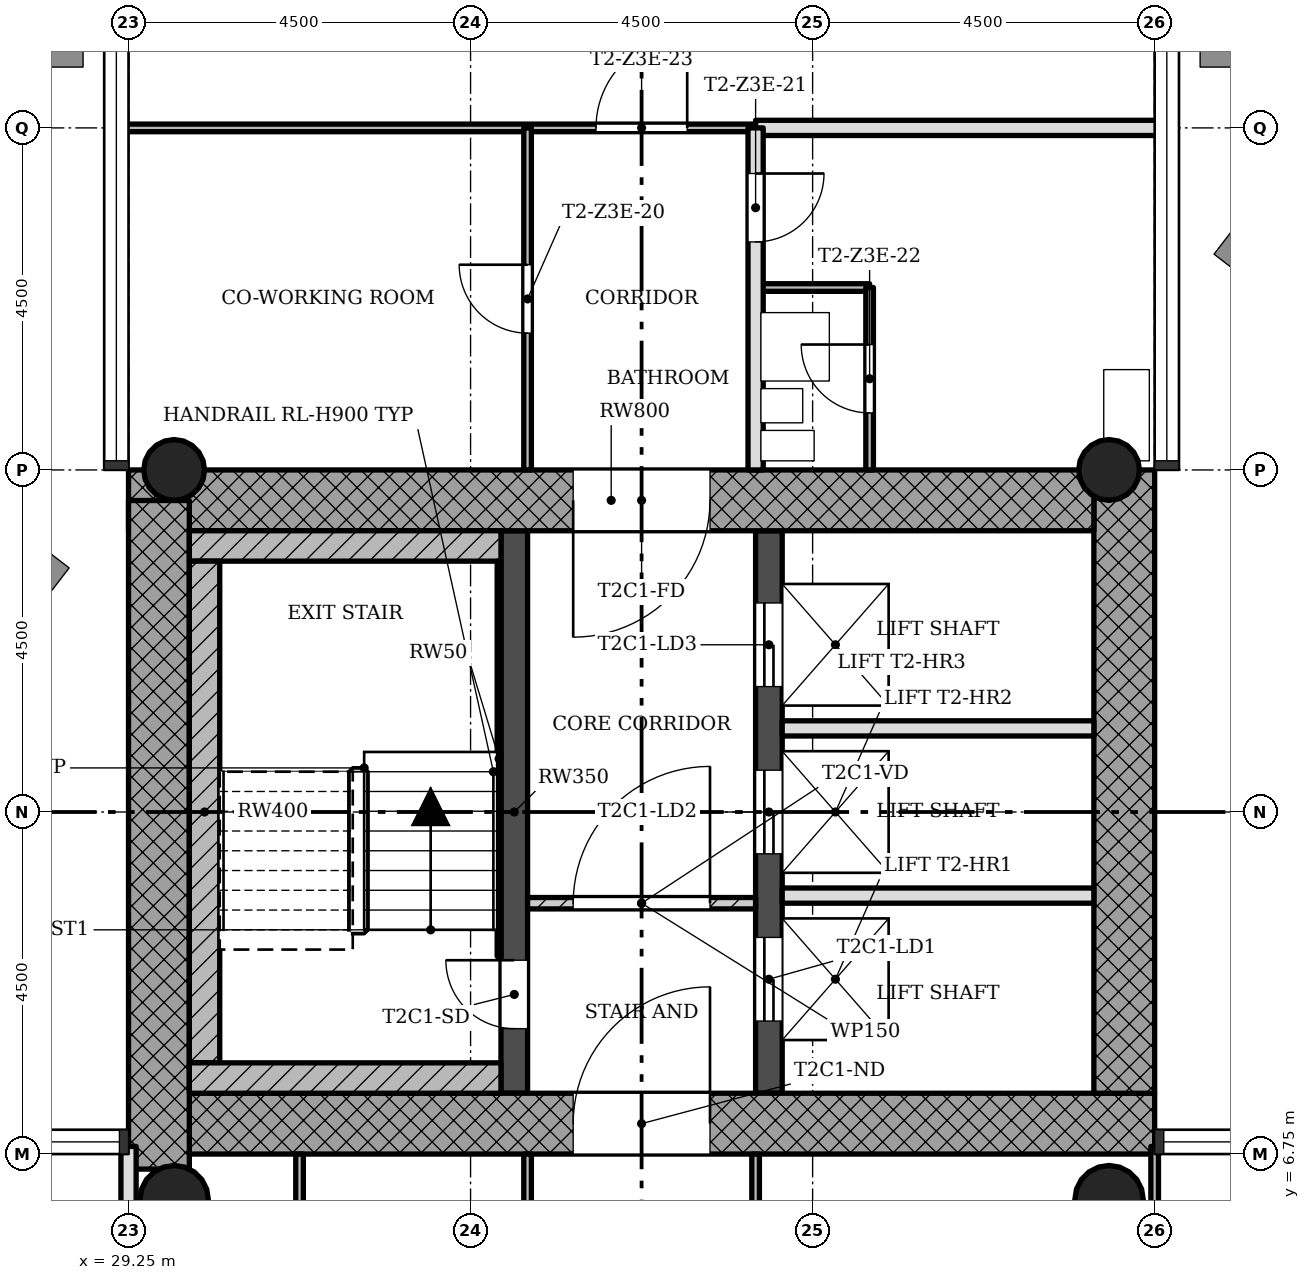
"""IFC4 building model, lengths in metres.
Left out: names, types, materials, properties, quantities, classifications, styles, units other than length and angle.
Written with IfcOpenShell. Run it as: python <this file> out.ifc"""

import sys

from ifc_helpers import new_model, si_unit, direction, frame, frame_2d, origin, origin_2d, place, context, subcontext, project, spatial, rectangle, hollow_circle, extrude, element, fill, save


model = new_model("IFC4")
c1 = context("Model", 3, precision=1e-05, world=origin(), true_north=direction((0.0, 1.0)))
c2 = subcontext(c1, "Body", "Model", "MODEL_VIEW")
j1 = project(units=[si_unit("LENGTHUNIT", "METRE"), si_unit("PLANEANGLEUNIT", "RADIAN")], contexts=[c1])
p1 = place(None, origin())
s1 = spatial("IfcSite", under=j1, at=p1, CompositionType="ELEMENT")
p2 = place(p1, origin())
s2 = spatial("IfcBuilding", under=s1, at=p2, CompositionType="ELEMENT")
p3 = place(p2, frame((0.0, 0.0, 177.9)))
s3 = spatial("IfcBuildingStorey", under=s2, at=p3, CompositionType="ELEMENT", Elevation=177.9)
p4 = place(p3, frame((30.05, 7.15, 0.0), z_axis=(0.0, 0.0, 1.0), x_axis=(1.0, 0.0, 0.0)))
e1 = element("IfcWall", 1, at=p4, inside=s3, PredefinedType="SHEAR", context=c2, shape_type="SweptSolid", body=[
    extrude(rectangle(XDim=12.7, YDim=0.8, at=frame_2d((6.35, 0.0))), origin(), (0.0, 0.0, 1.0), 3.4),
])
p5 = place(p4, frame((5.05, 0.0, 0.0)))
e2 = element("IfcOpeningElement", 2, at=p5, cuts=e1, PredefinedType="OPENING", context=c2, shape_type="SweptSolid", body=[
    extrude(rectangle(XDim=1.8, YDim=2.1, at=frame_2d((0.9, 1.05))), frame((0.0, 0.41, 0.0), z_axis=(0.0, -1.0, 0.0), x_axis=(1.0, 0.0, 0.0)), (0.0, 0.0, 1.0), 0.82),
])
p6 = place(p3, frame((42.35, 7.55, 0.0), z_axis=(0.0, 0.0, 1.0), x_axis=(0.0, 1.0, 0.0)))
e3 = element("IfcWall", 3, at=p6, inside=s3, PredefinedType="SHEAR", context=c2, shape_type="SweptSolid", body=[
    extrude(rectangle(XDim=8.2, YDim=0.8, at=frame_2d((4.1, 0.0))), origin(), (0.0, 0.0, 1.0), 3.4),
])
p7 = place(p3, frame((41.95, 15.35, 0.0), z_axis=(0.0, 0.0, 1.0), x_axis=(-1.0, 0.0, 0.0)))
e4 = element("IfcWall", 4, at=p7, inside=s3, PredefinedType="SHEAR", context=c2, shape_type="SweptSolid", body=[
    extrude(rectangle(XDim=12.7, YDim=0.8, at=frame_2d((6.35, 0.0))), origin(), (0.0, 0.0, 1.0), 3.4),
])
p8 = place(p7, frame((5.05, 0.0, 0.0)))
e5 = element("IfcOpeningElement", 5, at=p8, cuts=e4, PredefinedType="OPENING", context=c2, shape_type="SweptSolid", body=[
    extrude(rectangle(XDim=1.8, YDim=2.1, at=frame_2d((0.9, 1.05))), frame((0.0, 0.41, 0.0), z_axis=(0.0, -1.0, 0.0), x_axis=(1.0, 0.0, 0.0)), (0.0, 0.0, 1.0), 0.82),
])
p9 = place(p3, frame((29.65, 15.348, 0.0), z_axis=(0.0, 0.0, 1.0), x_axis=(0.0, -1.0, 0.0)))
e6 = element("IfcWall", 6, at=p9, inside=s3, PredefinedType="SHEAR", context=c2, shape_type="SweptSolid", body=[
    extrude(rectangle(XDim=8.796, YDim=0.8, at=frame_2d((4.398, 0.0))), origin(), (0.0, 0.0, 1.0), 3.4),
])
p10 = place(p3, frame((34.325, 7.55, 0.0), z_axis=(0.0, 0.0, 1.0), x_axis=(0.0, 1.0, 0.0)))
e7 = element("IfcWall", 7, at=p10, inside=s3, PredefinedType="SHEAR", context=c2, shape_type="SweptSolid", body=[
    extrude(rectangle(XDim=7.4, YDim=0.35, at=frame_2d((3.7, 0.0))), origin(), (0.0, 0.0, 1.0), 3.4),
])
p11 = place(p10, frame((0.85, 0.0, 0.0)))
e8 = element("IfcOpeningElement", 8, at=p11, cuts=e7, PredefinedType="OPENING", context=c2, shape_type="SweptSolid", body=[
    extrude(rectangle(XDim=0.9, YDim=2.1, at=frame_2d((0.45, 1.05))), frame((0.0, 0.185, 0.0), z_axis=(0.0, -1.0, 0.0), x_axis=(1.0, 0.0, 0.0)), (0.0, 0.0, 1.0), 0.37),
])
p12 = place(p3, frame((37.675, 7.55, 0.0), z_axis=(0.0, 0.0, 1.0), x_axis=(0.0, 1.0, 0.0)))
e9 = element("IfcWall", 9, at=p12, inside=s3, PredefinedType="SHEAR", context=c2, shape_type="SweptSolid", body=[
    extrude(rectangle(XDim=7.4, YDim=0.35, at=frame_2d((3.7, 0.0))), origin(), (0.0, 0.0, 1.0), 3.4),
])
p13 = place(p12, frame((0.95, 0.0, 0.0)))
e10 = element("IfcOpeningElement", 10, at=p13, cuts=e9, PredefinedType="OPENING", context=c2, shape_type="SweptSolid", body=[
    extrude(rectangle(XDim=1.1, YDim=2.1, at=frame_2d((0.55, 1.05))), frame((0.0, 0.185, 0.0), z_axis=(0.0, -1.0, 0.0), x_axis=(1.0, 0.0, 0.0)), (0.0, 0.0, 1.0), 0.37),
])
p14 = place(p12, frame((3.15, 0.0, 0.0)))
e11 = element("IfcOpeningElement", 11, at=p14, cuts=e9, PredefinedType="OPENING", context=c2, shape_type="SweptSolid", body=[
    extrude(rectangle(XDim=1.1, YDim=2.1, at=frame_2d((0.55, 1.05))), frame((0.0, 0.185, 0.0), z_axis=(0.0, -1.0, 0.0), x_axis=(1.0, 0.0, 0.0)), (0.0, 0.0, 1.0), 0.37),
])
p15 = place(p12, frame((5.35, 0.0, 0.0)))
e12 = element("IfcOpeningElement", 12, at=p15, cuts=e9, PredefinedType="OPENING", context=c2, shape_type="SweptSolid", body=[
    extrude(rectangle(XDim=1.1, YDim=2.1, at=frame_2d((0.55, 1.05))), frame((0.0, 0.185, 0.0), z_axis=(0.0, -1.0, 0.0), x_axis=(1.0, 0.0, 0.0)), (0.0, 0.0, 1.0), 0.37),
])
for number, where, z_axis, x_axis in (
    (13, (42.15, 15.75, 0.0), (0.0, 0.0, 1.0), (1.0, 0.0, 0.0)),
    (14, (29.85, 15.75, 0.0), (0.0, 0.0, 1.0), (1.0, 0.0, 0.0)),
):
    element("IfcColumn", number, at=place(p3, frame(where, z_axis=z_axis, x_axis=x_axis)), inside=s3, PredefinedType="COLUMN", context=c2, shape_type="SweptSolid", body=[
        extrude(hollow_circle(Radius=0.4, WallThickness=0.028, at=origin_2d()), origin(), (0.0, 0.0, 1.0), 3.4),
    ])
for number, where, z_axis, x_axis in (
    (15, (42.15, 6.15, 0.0), (0.0, 0.0, 1.0), (1.0, 0.0, 0.0)),
    (16, (29.85, 6.15, 0.0), (0.0, 0.0, 1.0), (1.0, 0.0, 0.0)),
):
    element("IfcColumn", number, at=place(p3, frame(where, z_axis=z_axis, x_axis=x_axis)), inside=s3, PredefinedType="COLUMN", context=c2, shape_type="SweptSolid", body=[
        extrude(hollow_circle(Radius=0.45, WallThickness=0.032, at=origin_2d()), origin(), (0.0, 0.0, 1.0), 3.4),
    ])
p16 = place(p3, frame((37.5, 10.05, 0.0), z_axis=(0.0, 0.0, 1.0), x_axis=(-1.0, 0.0, 0.0)))
e17 = element("IfcWall", 17, at=p16, inside=s3, PredefinedType="PARTITIONING", context=c2, shape_type="SweptSolid", body=[
    extrude(rectangle(XDim=3.0, YDim=0.15, at=frame_2d((1.5, 0.0))), origin(), (0.0, 0.0, 1.0), 3.0),
])
p17 = place(p16, frame((0.6, 0.0, 0.0)))
e18 = element("IfcOpeningElement", 18, at=p17, cuts=e17, PredefinedType="OPENING", context=c2, shape_type="SweptSolid", body=[
    extrude(rectangle(XDim=1.8, YDim=2.1, at=frame_2d((0.9, 1.05))), frame((0.0, 0.085, 0.0), z_axis=(0.0, -1.0, 0.0), x_axis=(1.0, 0.0, 0.0)), (0.0, 0.0, 1.0), 0.17),
])
for number, where, z_axis, x_axis in (
    (19, (41.95, 10.15, 0.0), (0.0, 0.0, 1.0), (-1.0, 0.0, 0.0)),
    (20, (41.95, 12.35, 0.0), (0.0, 0.0, 1.0), (-1.0, 0.0, 0.0)),
):
    element("IfcWall", number, at=place(p3, frame(where, z_axis=z_axis, x_axis=x_axis)), inside=s3, PredefinedType="SOLIDWALL", context=c2, shape_type="SweptSolid", body=[
        extrude(rectangle(XDim=4.1, YDim=0.2, at=frame_2d((2.05, 0.0))), origin(), (0.0, 0.0, 1.0), 3.0),
    ])
p18 = place(p3, frame((39.0, 18.15, 0.0), z_axis=(0.0, 0.0, 1.0), x_axis=(-1.0, 0.0, 0.0)))
e21 = element("IfcWall", 21, at=p18, inside=s3, PredefinedType="PARTITIONING", context=c2, shape_type="SweptSolid", body=[
    extrude(rectangle(XDim=1.5, YDim=0.1, at=frame_2d((0.75, 0.0))), origin(), (0.0, 0.0, 1.0), 3.0),
])
p19 = place(p3, frame((37.5, 20.25, 0.0), z_axis=(0.0, 0.0, 1.0), x_axis=(-1.0, 0.0, 0.0)))
e22 = element("IfcWall", 22, at=p19, inside=s3, PredefinedType="PARTITIONING", context=c2, shape_type="SweptSolid", body=[
    extrude(rectangle(XDim=8.35, YDim=0.1, at=frame_2d((4.175, 0.0))), origin(), (0.0, 0.0, 1.0), 3.0),
])
p20 = place(p19, frame((0.9, 0.0, 0.0)))
e23 = element("IfcOpeningElement", 23, at=p20, cuts=e22, PredefinedType="OPENING", context=c2, shape_type="SweptSolid", body=[
    extrude(rectangle(XDim=1.2, YDim=2.1, at=frame_2d((0.6, 1.05))), frame((0.0, 0.06, 0.0), z_axis=(0.0, -1.0, 0.0), x_axis=(1.0, 0.0, 0.0)), (0.0, 0.0, 1.0), 0.12),
])
p21 = place(p3, frame((42.85, 20.25, 0.0), z_axis=(0.0, 0.0, 1.0), x_axis=(-1.0, 0.0, 0.0)))
e24 = element("IfcWall", 24, at=p21, inside=s3, PredefinedType="SOLIDWALL", context=c2, shape_type="SweptSolid", body=[
    extrude(rectangle(XDim=5.35, YDim=0.2, at=frame_2d((2.675, 0.0))), origin(), (0.0, 0.0, 1.0), 3.0),
])
p22 = place(p3, frame((42.75, 0.9, 0.0), z_axis=(0.0, 0.0, 1.0), x_axis=(0.0, 1.0, 0.0)))
e25 = element("IfcWall", 25, at=p22, inside=s3, PredefinedType="PARTITIONING", context=c2, shape_type="SweptSolid", body=[
    extrude(rectangle(XDim=5.95, YDim=0.1, at=frame_2d((2.975, 0.0))), origin(), (0.0, 0.0, 1.0), 3.0),
])
p23 = place(p3, frame((39.0, 15.75, 0.0), z_axis=(0.0, 0.0, 1.0), x_axis=(0.0, 1.0, 0.0)))
e26 = element("IfcWall", 26, at=p23, inside=s3, PredefinedType="PARTITIONING", context=c2, shape_type="SweptSolid", body=[
    extrude(rectangle(XDim=2.4, YDim=0.1, at=frame_2d((1.2, 0.0))), origin(), (0.0, 0.0, 1.0), 3.0),
])
p24 = place(p23, frame((0.75, 0.0, 0.0)))
e27 = element("IfcOpeningElement", 27, at=p24, cuts=e26, PredefinedType="OPENING", context=c2, shape_type="SweptSolid", body=[
    extrude(rectangle(XDim=0.9, YDim=2.1, at=frame_2d((0.45, 1.05))), frame((0.0, 0.06, 0.0), z_axis=(0.0, -1.0, 0.0), x_axis=(1.0, 0.0, 0.0)), (0.0, 0.0, 1.0), 0.12),
])
p25 = place(p3, frame((37.5, 4.5, 0.0), z_axis=(0.0, 0.0, 1.0), x_axis=(0.0, 1.0, 0.0)))
e28 = element("IfcWall", 28, at=p25, inside=s3, PredefinedType="PARTITIONING", context=c2, shape_type="SweptSolid", body=[
    extrude(rectangle(XDim=2.25, YDim=0.1, at=frame_2d((1.125, 0.0))), origin(), (0.0, 0.0, 1.0), 3.0),
])
p26 = place(p3, frame((37.5, 15.75, 0.0), z_axis=(0.0, 0.0, 1.0), x_axis=(0.0, 1.0, 0.0)))
e29 = element("IfcWall", 29, at=p26, inside=s3, PredefinedType="SOLIDWALL", context=c2, shape_type="SweptSolid", body=[
    extrude(rectangle(XDim=4.5, YDim=0.2, at=frame_2d((2.25, 0.0))), origin(), (0.0, 0.0, 1.0), 3.0),
])
p27 = place(p26, frame((3.0, 0.0, 0.0)))
e30 = element("IfcOpeningElement", 30, at=p27, cuts=e29, PredefinedType="OPENING", context=c2, shape_type="SweptSolid", body=[
    extrude(rectangle(XDim=0.9, YDim=2.1, at=frame_2d((0.45, 1.05))), frame((0.0, 0.11, 0.0), z_axis=(0.0, -1.0, 0.0), x_axis=(1.0, 0.0, 0.0)), (0.0, 0.0, 1.0), 0.22),
])
p28 = place(p3, frame((34.5, 4.5, 0.0), z_axis=(0.0, 0.0, 1.0), x_axis=(0.0, 1.0, 0.0)))
e31 = element("IfcWall", 31, at=p28, inside=s3, PredefinedType="PARTITIONING", context=c2, shape_type="SweptSolid", body=[
    extrude(rectangle(XDim=2.25, YDim=0.1, at=frame_2d((1.125, 0.0))), origin(), (0.0, 0.0, 1.0), 3.0),
])
p29 = place(p3, frame((34.5, 15.75, 0.0), z_axis=(0.0, 0.0, 1.0), x_axis=(0.0, 1.0, 0.0)))
e32 = element("IfcWall", 32, at=p29, inside=s3, PredefinedType="PARTITIONING", context=c2, shape_type="SweptSolid", body=[
    extrude(rectangle(XDim=4.5, YDim=0.1, at=frame_2d((2.25, 0.0))), origin(), (0.0, 0.0, 1.0), 3.0),
])
p30 = place(p29, frame((1.8, 0.0, 0.0)))
e33 = element("IfcOpeningElement", 33, at=p30, cuts=e32, PredefinedType="OPENING", context=c2, shape_type="SweptSolid", body=[
    extrude(rectangle(XDim=0.9, YDim=2.1, at=frame_2d((0.45, 1.05))), frame((0.0, 0.06, 0.0), z_axis=(0.0, -1.0, 0.0), x_axis=(1.0, 0.0, 0.0)), (0.0, 0.0, 1.0), 0.12),
])
p31 = place(p3, frame((31.5, 0.9, 0.0), z_axis=(0.0, 0.0, 1.0), x_axis=(0.0, 1.0, 0.0)))
e34 = element("IfcWall", 34, at=p31, inside=s3, PredefinedType="PARTITIONING", context=c2, shape_type="SweptSolid", body=[
    extrude(rectangle(XDim=5.85, YDim=0.1, at=frame_2d((2.925, 0.0))), origin(), (0.0, 0.0, 1.0), 3.0),
])
p32 = place(p31, frame((1.35, 0.0, 0.0)))
e35 = element("IfcOpeningElement", 35, at=p32, cuts=e34, PredefinedType="OPENING", context=c2, shape_type="SweptSolid", body=[
    extrude(rectangle(XDim=0.9, YDim=2.1, at=frame_2d((0.45, 1.05))), frame((0.0, 0.06, 0.0), z_axis=(0.0, -1.0, 0.0), x_axis=(1.0, 0.0, 0.0)), (0.0, 0.0, 1.0), 0.12),
])
p33 = place(p3, frame((29.25, 0.9, 0.0), z_axis=(0.0, 0.0, 1.0), x_axis=(0.0, 1.0, 0.0)))
e36 = element("IfcWall", 36, at=p33, inside=s3, PredefinedType="SOLIDWALL", context=c2, shape_type="SweptSolid", body=[
    extrude(rectangle(XDim=5.95, YDim=0.2, at=frame_2d((2.975, 0.0))), origin(), (0.0, 0.0, 1.0), 3.0),
])
p34 = place(p3, frame((34.15, 14.75, 0.0), z_axis=(0.0, 0.0, 1.0), x_axis=(-1.0, 0.0, 0.0)))
e37 = element("IfcWall", 37, at=p34, inside=s3, PredefinedType="SHEAR", context=c2, shape_type="SweptSolid", body=[
    extrude(rectangle(XDim=4.1, YDim=0.4, at=frame_2d((2.05, 0.0))), origin(), (0.0, 0.0, 1.0), 3.4),
])
p35 = place(p3, frame((30.25, 7.95, 0.0), z_axis=(0.0, 0.0, 1.0), x_axis=(0.0, 1.0, 0.0)))
e38 = element("IfcWall", 38, at=p35, inside=s3, PredefinedType="SHEAR", context=c2, shape_type="SweptSolid", body=[
    extrude(rectangle(XDim=6.6, YDim=0.4, at=frame_2d((3.3, 0.0))), origin(), (0.0, 0.0, 1.0), 3.4),
])
p36 = place(p3, frame((34.15, 7.75, 0.0), z_axis=(0.0, 0.0, 1.0), x_axis=(-1.0, 0.0, 0.0)))
e39 = element("IfcWall", 39, at=p36, inside=s3, PredefinedType="SHEAR", context=c2, shape_type="SweptSolid", body=[
    extrude(rectangle(XDim=4.1, YDim=0.4, at=frame_2d((2.05, 0.0))), origin(), (0.0, 0.0, 1.0), 3.4),
])
p37 = place(p3, frame((34.125, 9.35, 0.0), z_axis=(0.0, 0.0, 1.0), x_axis=(0.0, 1.0, 0.0)))
e40 = element("IfcWall", 40, at=p37, inside=s3, PredefinedType="SHEAR", context=c2, shape_type="SweptSolid", body=[
    extrude(rectangle(XDim=5.2, YDim=0.05, at=frame_2d((2.6, 0.0))), origin(), (0.0, 0.0, 1.0), 3.4),
])
p38 = place(p17, origin())
e41 = element("IfcDoor", 41, at=p38, inside=s3, OperationType="SINGLE_SWING_LEFT", PredefinedType="DOOR", context=c2, shape_type="SweptSolid", body=[
    extrude(rectangle(XDim=1.8, YDim=2.1, at=frame_2d((0.9, 1.05))), frame((0.0, 0.025, 0.0), z_axis=(0.0, -1.0, 0.0), x_axis=(1.0, 0.0, 0.0)), (0.0, 0.0, 1.0), 0.05),
])
fill(e18, e41)
p39 = place(p30, origin())
e42 = element("IfcDoor", 42, at=p39, inside=s3, OperationType="SINGLE_SWING_LEFT", PredefinedType="DOOR", context=c2, shape_type="SweptSolid", body=[
    extrude(rectangle(XDim=0.9, YDim=2.1, at=frame_2d((0.45, 1.05))), frame((0.0, 0.025, 0.0), z_axis=(0.0, -1.0, 0.0), x_axis=(1.0, 0.0, 0.0)), (0.0, 0.0, 1.0), 0.05),
])
fill(e33, e42)
p40 = place(p27, origin())
e43 = element("IfcDoor", 43, at=p40, inside=s3, OperationType="SINGLE_SWING_RIGHT", PredefinedType="DOOR", context=c2, shape_type="SweptSolid", body=[
    extrude(rectangle(XDim=0.9, YDim=2.1, at=frame_2d((0.45, 1.05))), frame((0.0, 0.025, 0.0), z_axis=(0.0, -1.0, 0.0), x_axis=(1.0, 0.0, 0.0)), (0.0, 0.0, 1.0), 0.05),
])
fill(e30, e43)
p41 = place(p24, origin())
e44 = element("IfcDoor", 44, at=p41, inside=s3, OperationType="SINGLE_SWING_LEFT", PredefinedType="DOOR", context=c2, shape_type="SweptSolid", body=[
    extrude(rectangle(XDim=0.9, YDim=2.1, at=frame_2d((0.45, 1.05))), frame((0.0, 0.025, 0.0), z_axis=(0.0, -1.0, 0.0), x_axis=(1.0, 0.0, 0.0)), (0.0, 0.0, 1.0), 0.05),
])
fill(e27, e44)
p42 = place(p20, origin())
e45 = element("IfcDoor", 45, at=p42, inside=s3, OperationType="SINGLE_SWING_LEFT", PredefinedType="DOOR", context=c2, shape_type="SweptSolid", body=[
    extrude(rectangle(XDim=1.2, YDim=2.1, at=frame_2d((0.6, 1.05))), frame((0.0, 0.025, 0.0), z_axis=(0.0, -1.0, 0.0), x_axis=(1.0, 0.0, 0.0)), (0.0, 0.0, 1.0), 0.05),
])
fill(e23, e45)
p43 = place(p11, origin())
e46 = element("IfcDoor", 46, at=p43, inside=s3, OperationType="SINGLE_SWING_LEFT", PredefinedType="DOOR", context=c2, shape_type="SweptSolid", body=[
    extrude(rectangle(XDim=0.9, YDim=2.1, at=frame_2d((0.45, 1.05))), frame((0.0, 0.025, 0.0), z_axis=(0.0, -1.0, 0.0), x_axis=(1.0, 0.0, 0.0)), (0.0, 0.0, 1.0), 0.05),
])
fill(e8, e46)
p44 = place(p13, origin())
e47 = element("IfcDoor", 47, at=p44, inside=s3, OperationType="SLIDING_TO_LEFT", PredefinedType="DOOR", context=c2, shape_type="SweptSolid", body=[
    extrude(rectangle(XDim=1.1, YDim=2.1, at=frame_2d((0.55, 1.05))), frame((0.0, 0.025, 0.0), z_axis=(0.0, -1.0, 0.0), x_axis=(1.0, 0.0, 0.0)), (0.0, 0.0, 1.0), 0.05),
])
fill(e10, e47)
p45 = place(p14, origin())
e48 = element("IfcDoor", 48, at=p45, inside=s3, OperationType="SLIDING_TO_LEFT", PredefinedType="DOOR", context=c2, shape_type="SweptSolid", body=[
    extrude(rectangle(XDim=1.1, YDim=2.1, at=frame_2d((0.55, 1.05))), frame((0.0, 0.025, 0.0), z_axis=(0.0, -1.0, 0.0), x_axis=(1.0, 0.0, 0.0)), (0.0, 0.0, 1.0), 0.05),
])
fill(e11, e48)
p46 = place(p15, origin())
e49 = element("IfcDoor", 49, at=p46, inside=s3, OperationType="SLIDING_TO_LEFT", PredefinedType="DOOR", context=c2, shape_type="SweptSolid", body=[
    extrude(rectangle(XDim=1.1, YDim=2.1, at=frame_2d((0.55, 1.05))), frame((0.0, 0.025, 0.0), z_axis=(0.0, -1.0, 0.0), x_axis=(1.0, 0.0, 0.0)), (0.0, 0.0, 1.0), 0.05),
])
fill(e12, e49)
p47 = place(p5, origin())
e50 = element("IfcDoor", 50, at=p47, inside=s3, OperationType="SINGLE_SWING_LEFT", PredefinedType="DOOR", context=c2, shape_type="SweptSolid", body=[
    extrude(rectangle(XDim=1.8, YDim=2.1, at=frame_2d((0.9, 1.05))), frame((0.0, 0.025, 0.0), z_axis=(0.0, -1.0, 0.0), x_axis=(1.0, 0.0, 0.0)), (0.0, 0.0, 1.0), 0.05),
])
fill(e2, e50)
p48 = place(p8, origin())
e51 = element("IfcDoor", 51, at=p48, inside=s3, OperationType="SINGLE_SWING_LEFT", PredefinedType="DOOR", context=c2, shape_type="SweptSolid", body=[
    extrude(rectangle(XDim=1.8, YDim=2.1, at=frame_2d((0.9, 1.05))), frame((0.0, 0.025, 0.0), z_axis=(0.0, -1.0, 0.0), x_axis=(1.0, 0.0, 0.0)), (0.0, 0.0, 1.0), 0.05),
])
fill(e5, e51)
save(model, sys.argv[1])
